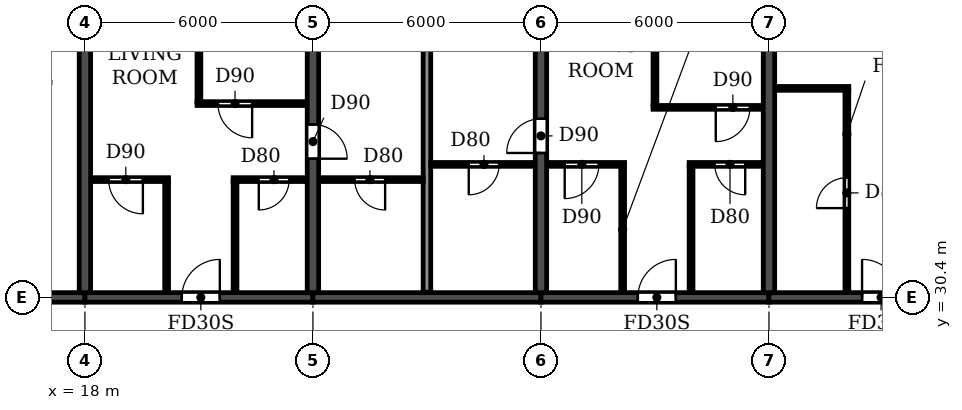
"""IFC4 building model, lengths in metres.
Left out: names, types, materials, properties, quantities, classifications, styles, units other than length and angle.
Written with IfcOpenShell. Run it as: python <this file> out.ifc"""

import sys

from ifc_helpers import new_model, si_unit, direction, frame, frame_2d, origin, place, context, subcontext, project, spatial, rectangle, extrude, element, fill, save


model = new_model("IFC4")
c1 = context("Model", 3, precision=1e-05, world=origin(), true_north=direction((0.0, 1.0)))
c2 = subcontext(c1, "Body", "Model", "MODEL_VIEW")
j1 = project(units=[si_unit("LENGTHUNIT", "METRE"), si_unit("PLANEANGLEUNIT", "RADIAN")], contexts=[c1])
p1 = place(None, origin())
s1 = spatial("IfcSite", under=j1, at=p1, CompositionType="ELEMENT")
p2 = place(p1, origin())
s2 = spatial("IfcBuilding", under=s1, at=p2, CompositionType="ELEMENT")
p3 = place(p2, frame((0.0, 0.0, 132.3)))
s3 = spatial("IfcBuildingStorey", under=s2, at=p3, CompositionType="ELEMENT", Elevation=132.3)
p4 = place(p3, frame((18.0, 30.525, 0.0), z_axis=(0.0, 0.0, 1.0), x_axis=(0.0, 1.0, 0.0)))
e1 = element("IfcWall", 1, at=p4, inside=s3, PredefinedType="SHEAR", context=c2, shape_type="SweptSolid", body=[
    extrude(rectangle(XDim=11.675, YDim=0.3, at=frame_2d((5.837, 0.0))), origin(), (0.0, 0.0, 1.0), 3.07),
])
p5 = place(p3, frame((24.0, 30.525, 0.0), z_axis=(0.0, 0.0, 1.0), x_axis=(0.0, 1.0, 0.0)))
e2 = element("IfcWall", 2, at=p5, inside=s3, PredefinedType="SHEAR", context=c2, shape_type="SweptSolid", body=[
    extrude(rectangle(XDim=11.675, YDim=0.3, at=frame_2d((5.837, 0.0))), origin(), (0.0, 0.0, 1.0), 3.07),
])
p6 = place(p5, frame((3.525, 0.0, 0.0)))
e3 = element("IfcOpeningElement", 3, at=p6, cuts=e2, PredefinedType="OPENING", context=c2, shape_type="SweptSolid", body=[
    extrude(rectangle(XDim=0.9, YDim=2.1, at=frame_2d((0.45, 1.05))), frame((0.0, 0.16, 0.0), z_axis=(0.0, -1.0, 0.0), x_axis=(1.0, 0.0, 0.0)), (0.0, 0.0, 1.0), 0.32),
])
p7 = place(p3, frame((30.0, 30.525, 0.0), z_axis=(0.0, 0.0, 1.0), x_axis=(0.0, 1.0, 0.0)))
e4 = element("IfcWall", 4, at=p7, inside=s3, PredefinedType="SHEAR", context=c2, shape_type="SweptSolid", body=[
    extrude(rectangle(XDim=11.675, YDim=0.3, at=frame_2d((5.837, 0.0))), origin(), (0.0, 0.0, 1.0), 3.07),
])
p8 = place(p7, frame((3.675, 0.0, 0.0)))
e5 = element("IfcOpeningElement", 5, at=p8, cuts=e4, PredefinedType="OPENING", context=c2, shape_type="SweptSolid", body=[
    extrude(rectangle(XDim=0.9, YDim=2.1, at=frame_2d((0.45, 1.05))), frame((0.0, 0.16, 0.0), z_axis=(0.0, -1.0, 0.0), x_axis=(1.0, 0.0, 0.0)), (0.0, 0.0, 1.0), 0.32),
])
p9 = place(p3, frame((36.0, 30.525, 0.0), z_axis=(0.0, 0.0, 1.0), x_axis=(0.0, 1.0, 0.0)))
e6 = element("IfcWall", 6, at=p9, inside=s3, PredefinedType="SHEAR", context=c2, shape_type="SweptSolid", body=[
    extrude(rectangle(XDim=11.675, YDim=0.3, at=frame_2d((5.837, 0.0))), origin(), (0.0, 0.0, 1.0), 3.07),
])
p10 = place(p3, frame((12.2, 30.4, 0.0), z_axis=(0.0, 0.0, 1.0), x_axis=(1.0, 0.0, 0.0)))
e7 = element("IfcWall", 7, at=p10, inside=s3, PredefinedType="SHEAR", context=c2, shape_type="SweptSolid", body=[
    extrude(rectangle(XDim=5.8, YDim=0.25, at=frame_2d((2.9, 0.0))), origin(), (0.0, 0.0, 1.0), 2.47),
])
p11 = place(p10, frame((2.3, 0.0, 0.0)))
e8 = element("IfcOpeningElement", 8, at=p11, cuts=e7, PredefinedType="OPENING", context=c2, shape_type="SweptSolid", body=[
    extrude(rectangle(XDim=1.0, YDim=2.1, at=frame_2d((0.5, 1.05))), frame((0.0, 0.135, 0.0), z_axis=(0.0, -1.0, 0.0), x_axis=(1.0, 0.0, 0.0)), (0.0, 0.0, 1.0), 0.27),
])
p12 = place(p3, frame((18.0, 30.4, 0.0), z_axis=(0.0, 0.0, 1.0), x_axis=(1.0, 0.0, 0.0)))
e9 = element("IfcWall", 9, at=p12, inside=s3, PredefinedType="SHEAR", context=c2, shape_type="SweptSolid", body=[
    extrude(rectangle(XDim=6.0, YDim=0.25, at=frame_2d((3.0, 0.0))), origin(), (0.0, 0.0, 1.0), 2.47),
])
p13 = place(p12, frame((2.55, 0.0, 0.0)))
e10 = element("IfcOpeningElement", 10, at=p13, cuts=e9, PredefinedType="OPENING", context=c2, shape_type="SweptSolid", body=[
    extrude(rectangle(XDim=1.0, YDim=2.1, at=frame_2d((0.5, 1.05))), frame((0.0, 0.135, 0.0), z_axis=(0.0, -1.0, 0.0), x_axis=(1.0, 0.0, 0.0)), (0.0, 0.0, 1.0), 0.27),
])
p14 = place(p3, frame((24.0, 30.4, 0.0), z_axis=(0.0, 0.0, 1.0), x_axis=(1.0, 0.0, 0.0)))
e11 = element("IfcWall", 11, at=p14, inside=s3, PredefinedType="SHEAR", context=c2, shape_type="SweptSolid", body=[
    extrude(rectangle(XDim=6.0, YDim=0.25, at=frame_2d((3.0, 0.0))), origin(), (0.0, 0.0, 1.0), 2.47),
])
p15 = place(p3, frame((30.0, 30.4, 0.0), z_axis=(0.0, 0.0, 1.0), x_axis=(1.0, 0.0, 0.0)))
e12 = element("IfcWall", 12, at=p15, inside=s3, PredefinedType="SHEAR", context=c2, shape_type="SweptSolid", body=[
    extrude(rectangle(XDim=6.0, YDim=0.25, at=frame_2d((3.0, 0.0))), origin(), (0.0, 0.0, 1.0), 2.47),
])
p16 = place(p15, frame((2.55, 0.0, 0.0)))
e13 = element("IfcOpeningElement", 13, at=p16, cuts=e12, PredefinedType="OPENING", context=c2, shape_type="SweptSolid", body=[
    extrude(rectangle(XDim=1.0, YDim=2.1, at=frame_2d((0.5, 1.05))), frame((0.0, 0.135, 0.0), z_axis=(0.0, -1.0, 0.0), x_axis=(1.0, 0.0, 0.0)), (0.0, 0.0, 1.0), 0.27),
])
p17 = place(p3, frame((36.0, 30.4, 0.0), z_axis=(0.0, 0.0, 1.0), x_axis=(1.0, 0.0, 0.0)))
e14 = element("IfcWall", 14, at=p17, inside=s3, PredefinedType="SHEAR", context=c2, shape_type="SweptSolid", body=[
    extrude(rectangle(XDim=6.0, YDim=0.25, at=frame_2d((3.0, 0.0))), origin(), (0.0, 0.0, 1.0), 2.47),
])
p18 = place(p17, frame((2.45, 0.0, 0.0)))
e15 = element("IfcOpeningElement", 15, at=p18, cuts=e14, PredefinedType="OPENING", context=c2, shape_type="SweptSolid", body=[
    extrude(rectangle(XDim=1.0, YDim=2.1, at=frame_2d((0.5, 1.05))), frame((0.0, 0.135, 0.0), z_axis=(0.0, -1.0, 0.0), x_axis=(1.0, 0.0, 0.0)), (0.0, 0.0, 1.0), 0.27),
])
p19 = place(p3, frame((27.0, 30.535, 0.0), z_axis=(0.0, 0.0, 1.0), x_axis=(0.0, 1.0, 0.0)))
e16 = element("IfcWall", 16, at=p19, inside=s3, PredefinedType="PARTITIONING", context=c2, shape_type="SweptSolid", body=[
    extrude(rectangle(XDim=11.805, YDim=0.2, at=frame_2d((5.903, 0.0))), origin(), (0.0, 0.0, 1.0), 3.07),
])
p20 = place(p3, frame((18.16, 33.5, 0.0), z_axis=(0.0, 0.0, 1.0), x_axis=(1.0, 0.0, 0.0)))
e17 = element("IfcWall", 17, at=p20, inside=s3, PredefinedType="PARTITIONING", context=c2, shape_type="SweptSolid", body=[
    extrude(rectangle(XDim=2.04, YDim=0.1, at=frame_2d((1.02, 0.0))), origin(), (0.0, 0.0, 1.0), 3.07),
])
p21 = place(p20, frame((0.465, 0.0, 0.0)))
e18 = element("IfcOpeningElement", 18, at=p21, cuts=e17, PredefinedType="OPENING", context=c2, shape_type="SweptSolid", body=[
    extrude(rectangle(XDim=0.9, YDim=2.1, at=frame_2d((0.45, 1.05))), frame((0.0, 0.06, 0.0), z_axis=(0.0, -1.0, 0.0), x_axis=(1.0, 0.0, 0.0)), (0.0, 0.0, 1.0), 0.12),
])
p22 = place(p3, frame((21.9, 33.5, 0.0), z_axis=(0.0, 0.0, 1.0), x_axis=(1.0, 0.0, 0.0)))
e19 = element("IfcWall", 19, at=p22, inside=s3, PredefinedType="PARTITIONING", context=c2, shape_type="SweptSolid", body=[
    extrude(rectangle(XDim=1.94, YDim=0.1, at=frame_2d((0.97, 0.0))), origin(), (0.0, 0.0, 1.0), 3.07),
])
p23 = place(p22, frame((0.675, 0.0, 0.0)))
e20 = element("IfcOpeningElement", 20, at=p23, cuts=e19, PredefinedType="OPENING", context=c2, shape_type="SweptSolid", body=[
    extrude(rectangle(XDim=0.8, YDim=2.1, at=frame_2d((0.4, 1.05))), frame((0.0, 0.06, 0.0), z_axis=(0.0, -1.0, 0.0), x_axis=(1.0, 0.0, 0.0)), (0.0, 0.0, 1.0), 0.12),
])
p24 = place(p3, frame((24.16, 33.5, 0.0), z_axis=(0.0, 0.0, 1.0), x_axis=(1.0, 0.0, 0.0)))
e21 = element("IfcWall", 21, at=p24, inside=s3, PredefinedType="PARTITIONING", context=c2, shape_type="SweptSolid", body=[
    extrude(rectangle(XDim=2.74, YDim=0.1, at=frame_2d((1.37, 0.0))), origin(), (0.0, 0.0, 1.0), 3.07),
])
p25 = place(p24, frame((0.94, 0.0, 0.0)))
e22 = element("IfcOpeningElement", 22, at=p25, cuts=e21, PredefinedType="OPENING", context=c2, shape_type="SweptSolid", body=[
    extrude(rectangle(XDim=0.8, YDim=2.1, at=frame_2d((0.4, 1.05))), frame((0.0, 0.06, 0.0), z_axis=(0.0, -1.0, 0.0), x_axis=(1.0, 0.0, 0.0)), (0.0, 0.0, 1.0), 0.12),
])
p26 = place(p3, frame((27.1, 33.9, 0.0), z_axis=(0.0, 0.0, 1.0), x_axis=(1.0, 0.0, 0.0)))
e23 = element("IfcWall", 23, at=p26, inside=s3, PredefinedType="PARTITIONING", context=c2, shape_type="SweptSolid", body=[
    extrude(rectangle(XDim=2.74, YDim=0.1, at=frame_2d((1.37, 0.0))), origin(), (0.0, 0.0, 1.0), 3.07),
])
p27 = place(p26, frame((1.0, 0.0, 0.0)))
e24 = element("IfcOpeningElement", 24, at=p27, cuts=e23, PredefinedType="OPENING", context=c2, shape_type="SweptSolid", body=[
    extrude(rectangle(XDim=0.8, YDim=2.1, at=frame_2d((0.4, 1.05))), frame((0.0, 0.06, 0.0), z_axis=(0.0, -1.0, 0.0), x_axis=(1.0, 0.0, 0.0)), (0.0, 0.0, 1.0), 0.12),
])
p28 = place(p3, frame((30.16, 33.9, 0.0), z_axis=(0.0, 0.0, 1.0), x_axis=(1.0, 0.0, 0.0)))
e25 = element("IfcWall", 25, at=p28, inside=s3, PredefinedType="PARTITIONING", context=c2, shape_type="SweptSolid", body=[
    extrude(rectangle(XDim=2.04, YDim=0.1, at=frame_2d((1.02, 0.0))), origin(), (0.0, 0.0, 1.0), 3.07),
])
p29 = place(p28, frame((0.465, 0.0, 0.0)))
e26 = element("IfcOpeningElement", 26, at=p29, cuts=e25, PredefinedType="OPENING", context=c2, shape_type="SweptSolid", body=[
    extrude(rectangle(XDim=0.9, YDim=2.1, at=frame_2d((0.45, 1.05))), frame((0.0, 0.06, 0.0), z_axis=(0.0, -1.0, 0.0), x_axis=(1.0, 0.0, 0.0)), (0.0, 0.0, 1.0), 0.12),
])
p30 = place(p3, frame((33.9, 33.9, 0.0), z_axis=(0.0, 0.0, 1.0), x_axis=(1.0, 0.0, 0.0)))
e27 = element("IfcWall", 27, at=p30, inside=s3, PredefinedType="PARTITIONING", context=c2, shape_type="SweptSolid", body=[
    extrude(rectangle(XDim=1.94, YDim=0.1, at=frame_2d((0.97, 0.0))), origin(), (0.0, 0.0, 1.0), 3.07),
])
p31 = place(p30, frame((0.675, 0.0, 0.0)))
e28 = element("IfcOpeningElement", 28, at=p31, cuts=e27, PredefinedType="OPENING", context=c2, shape_type="SweptSolid", body=[
    extrude(rectangle(XDim=0.8, YDim=2.1, at=frame_2d((0.4, 1.05))), frame((0.0, 0.06, 0.0), z_axis=(0.0, -1.0, 0.0), x_axis=(1.0, 0.0, 0.0)), (0.0, 0.0, 1.0), 0.12),
])
p32 = place(p3, frame((32.95, 35.4, 0.0), z_axis=(0.0, 0.0, 1.0), x_axis=(1.0, 0.0, 0.0)))
e29 = element("IfcWall", 29, at=p32, inside=s3, PredefinedType="PARTITIONING", context=c2, shape_type="SweptSolid", body=[
    extrude(rectangle(XDim=2.89, YDim=0.1, at=frame_2d((1.445, 0.0))), origin(), (0.0, 0.0, 1.0), 3.07),
])
p33 = place(p32, frame((1.65, 0.0, 0.0)))
e30 = element("IfcOpeningElement", 30, at=p33, cuts=e29, PredefinedType="OPENING", context=c2, shape_type="SweptSolid", body=[
    extrude(rectangle(XDim=0.9, YDim=2.1, at=frame_2d((0.45, 1.05))), frame((0.0, 0.06, 0.0), z_axis=(0.0, -1.0, 0.0), x_axis=(1.0, 0.0, 0.0)), (0.0, 0.0, 1.0), 0.12),
])
p34 = place(p3, frame((20.95, 35.5, 0.0), z_axis=(0.0, 0.0, 1.0), x_axis=(1.0, 0.0, 0.0)))
e31 = element("IfcWall", 31, at=p34, inside=s3, PredefinedType="PARTITIONING", context=c2, shape_type="SweptSolid", body=[
    extrude(rectangle(XDim=2.89, YDim=0.1, at=frame_2d((1.445, 0.0))), origin(), (0.0, 0.0, 1.0), 3.07),
])
p35 = place(p34, frame((0.55, 0.0, 0.0)))
e32 = element("IfcOpeningElement", 32, at=p35, cuts=e31, PredefinedType="OPENING", context=c2, shape_type="SweptSolid", body=[
    extrude(rectangle(XDim=0.9, YDim=2.1, at=frame_2d((0.45, 1.05))), frame((0.0, 0.06, 0.0), z_axis=(0.0, -1.0, 0.0), x_axis=(1.0, 0.0, 0.0)), (0.0, 0.0, 1.0), 0.12),
])
p36 = place(p3, frame((36.16, 35.9, 0.0), z_axis=(0.0, 0.0, 1.0), x_axis=(1.0, 0.0, 0.0)))
e33 = element("IfcWall", 33, at=p36, inside=s3, PredefinedType="PARTITIONING", context=c2, shape_type="SweptSolid", body=[
    extrude(rectangle(XDim=1.94, YDim=0.1, at=frame_2d((0.97, 0.0))), origin(), (0.0, 0.0, 1.0), 3.07),
])
p37 = place(p3, frame((20.15, 30.535, 0.0), z_axis=(0.0, 0.0, 1.0), x_axis=(0.0, 1.0, 0.0)))
e34 = element("IfcWall", 34, at=p37, inside=s3, PredefinedType="PARTITIONING", context=c2, shape_type="SweptSolid", body=[
    extrude(rectangle(XDim=2.915, YDim=0.1, at=frame_2d((1.458, 0.0))), origin(), (0.0, 0.0, 1.0), 3.07),
])
p38 = place(p3, frame((21.0, 35.55, 0.0), z_axis=(0.0, 0.0, 1.0), x_axis=(0.0, 1.0, 0.0)))
e35 = element("IfcWall", 35, at=p38, inside=s3, PredefinedType="PARTITIONING", context=c2, shape_type="SweptSolid", body=[
    extrude(rectangle(XDim=6.79, YDim=0.1, at=frame_2d((3.395, 0.0))), origin(), (0.0, 0.0, 1.0), 3.07),
])
p39 = place(p3, frame((21.95, 30.535, 0.0), z_axis=(0.0, 0.0, 1.0), x_axis=(0.0, 1.0, 0.0)))
e36 = element("IfcWall", 36, at=p39, inside=s3, PredefinedType="PARTITIONING", context=c2, shape_type="SweptSolid", body=[
    extrude(rectangle(XDim=2.915, YDim=0.1, at=frame_2d((1.458, 0.0))), origin(), (0.0, 0.0, 1.0), 3.07),
])
p40 = place(p3, frame((32.15, 30.535, 0.0), z_axis=(0.0, 0.0, 1.0), x_axis=(0.0, 1.0, 0.0)))
e37 = element("IfcWall", 37, at=p40, inside=s3, PredefinedType="PARTITIONING", context=c2, shape_type="SweptSolid", body=[
    extrude(rectangle(XDim=3.315, YDim=0.1, at=frame_2d((1.658, 0.0))), origin(), (0.0, 0.0, 1.0), 3.07),
])
p41 = place(p3, frame((33.0, 35.45, 0.0), z_axis=(0.0, 0.0, 1.0), x_axis=(0.0, 1.0, 0.0)))
e38 = element("IfcWall", 38, at=p41, inside=s3, PredefinedType="PARTITIONING", context=c2, shape_type="SweptSolid", body=[
    extrude(rectangle(XDim=6.89, YDim=0.1, at=frame_2d((3.445, 0.0))), origin(), (0.0, 0.0, 1.0), 3.07),
])
p42 = place(p3, frame((33.95, 30.535, 0.0), z_axis=(0.0, 0.0, 1.0), x_axis=(0.0, 1.0, 0.0)))
e39 = element("IfcWall", 39, at=p42, inside=s3, PredefinedType="PARTITIONING", context=c2, shape_type="SweptSolid", body=[
    extrude(rectangle(XDim=3.315, YDim=0.1, at=frame_2d((1.658, 0.0))), origin(), (0.0, 0.0, 1.0), 3.07),
])
p43 = place(p3, frame((38.05, 30.535, 0.0), z_axis=(0.0, 0.0, 1.0), x_axis=(0.0, 1.0, 0.0)))
e40 = element("IfcWall", 40, at=p43, inside=s3, PredefinedType="PARTITIONING", context=c2, shape_type="SweptSolid", body=[
    extrude(rectangle(XDim=5.315, YDim=0.1, at=frame_2d((2.658, 0.0))), origin(), (0.0, 0.0, 1.0), 3.07),
])
p44 = place(p43, frame((2.215, 0.0, 0.0)))
e41 = element("IfcOpeningElement", 41, at=p44, cuts=e40, PredefinedType="OPENING", context=c2, shape_type="SweptSolid", body=[
    extrude(rectangle(XDim=0.8, YDim=2.1, at=frame_2d((0.4, 1.05))), frame((0.0, 0.06, 0.0), z_axis=(0.0, -1.0, 0.0), x_axis=(1.0, 0.0, 0.0)), (0.0, 0.0, 1.0), 0.12),
])
p45 = place(p25, frame((0.8, 0.0, 0.0), z_axis=(0.0, 0.0, 1.0), x_axis=(-1.0, 0.0, 0.0)))
e42 = element("IfcDoor", 42, at=p45, inside=s3, OperationType="SINGLE_SWING_LEFT", PredefinedType="DOOR", context=c2, shape_type="SweptSolid", body=[
    extrude(rectangle(XDim=0.8, YDim=2.1, at=frame_2d((0.4, 1.05))), frame((0.0, 0.025, 0.0), z_axis=(0.0, -1.0, 0.0), x_axis=(1.0, 0.0, 0.0)), (0.0, 0.0, 1.0), 0.05),
])
fill(e22, e42)
p46 = place(p21, frame((0.9, 0.0, 0.0), z_axis=(0.0, 0.0, 1.0), x_axis=(-1.0, 0.0, 0.0)))
e43 = element("IfcDoor", 43, at=p46, inside=s3, OperationType="SINGLE_SWING_LEFT", PredefinedType="DOOR", context=c2, shape_type="SweptSolid", body=[
    extrude(rectangle(XDim=0.9, YDim=2.1, at=frame_2d((0.45, 1.05))), frame((0.0, 0.025, 0.0), z_axis=(0.0, -1.0, 0.0), x_axis=(1.0, 0.0, 0.0)), (0.0, 0.0, 1.0), 0.05),
])
fill(e18, e43)
p47 = place(p13, origin())
e44 = element("IfcDoor", 44, at=p47, inside=s3, OperationType="SINGLE_SWING_RIGHT", PredefinedType="DOOR", context=c2, shape_type="SweptSolid", body=[
    extrude(rectangle(XDim=1.0, YDim=2.1, at=frame_2d((0.5, 1.05))), frame((0.0, 0.025, 0.0), z_axis=(0.0, -1.0, 0.0), x_axis=(1.0, 0.0, 0.0)), (0.0, 0.0, 1.0), 0.05),
])
fill(e10, e44)
p48 = place(p35, frame((0.9, 0.0, 0.0), z_axis=(0.0, 0.0, 1.0), x_axis=(-1.0, 0.0, 0.0)))
e45 = element("IfcDoor", 45, at=p48, inside=s3, OperationType="SINGLE_SWING_LEFT", PredefinedType="DOOR", context=c2, shape_type="SweptSolid", body=[
    extrude(rectangle(XDim=0.9, YDim=2.1, at=frame_2d((0.45, 1.05))), frame((0.0, 0.025, 0.0), z_axis=(0.0, -1.0, 0.0), x_axis=(1.0, 0.0, 0.0)), (0.0, 0.0, 1.0), 0.05),
])
fill(e32, e45)
p49 = place(p23, frame((0.8, 0.0, 0.0), z_axis=(0.0, 0.0, 1.0), x_axis=(-1.0, 0.0, 0.0)))
e46 = element("IfcDoor", 46, at=p49, inside=s3, OperationType="SINGLE_SWING_RIGHT", PredefinedType="DOOR", context=c2, shape_type="SweptSolid", body=[
    extrude(rectangle(XDim=0.8, YDim=2.1, at=frame_2d((0.4, 1.05))), frame((0.0, 0.025, 0.0), z_axis=(0.0, -1.0, 0.0), x_axis=(1.0, 0.0, 0.0)), (0.0, 0.0, 1.0), 0.05),
])
fill(e20, e46)
p50 = place(p6, frame((0.9, 0.0, 0.0), z_axis=(0.0, 0.0, 1.0), x_axis=(-1.0, 0.0, 0.0)))
e47 = element("IfcDoor", 47, at=p50, inside=s3, OperationType="SINGLE_SWING_RIGHT", PredefinedType="DOOR", context=c2, shape_type="SweptSolid", body=[
    extrude(rectangle(XDim=0.9, YDim=2.1, at=frame_2d((0.45, 1.05))), frame((0.0, 0.025, 0.0), z_axis=(0.0, -1.0, 0.0), x_axis=(1.0, 0.0, 0.0)), (0.0, 0.0, 1.0), 0.05),
])
fill(e3, e47)
p51 = place(p27, frame((0.8, 0.0, 0.0), z_axis=(0.0, 0.0, 1.0), x_axis=(-1.0, 0.0, 0.0)))
e48 = element("IfcDoor", 48, at=p51, inside=s3, OperationType="SINGLE_SWING_RIGHT", PredefinedType="DOOR", context=c2, shape_type="SweptSolid", body=[
    extrude(rectangle(XDim=0.8, YDim=2.1, at=frame_2d((0.4, 1.05))), frame((0.0, 0.025, 0.0), z_axis=(0.0, -1.0, 0.0), x_axis=(1.0, 0.0, 0.0)), (0.0, 0.0, 1.0), 0.05),
])
fill(e24, e48)
p52 = place(p8, origin())
e49 = element("IfcDoor", 49, at=p52, inside=s3, OperationType="SINGLE_SWING_LEFT", PredefinedType="DOOR", context=c2, shape_type="SweptSolid", body=[
    extrude(rectangle(XDim=0.9, YDim=2.1, at=frame_2d((0.45, 1.05))), frame((0.0, 0.025, 0.0), z_axis=(0.0, -1.0, 0.0), x_axis=(1.0, 0.0, 0.0)), (0.0, 0.0, 1.0), 0.05),
])
fill(e5, e49)
p53 = place(p29, frame((0.9, 0.0, 0.0), z_axis=(0.0, 0.0, 1.0), x_axis=(-1.0, 0.0, 0.0)))
e50 = element("IfcDoor", 50, at=p53, inside=s3, OperationType="SINGLE_SWING_RIGHT", PredefinedType="DOOR", context=c2, shape_type="SweptSolid", body=[
    extrude(rectangle(XDim=0.9, YDim=2.1, at=frame_2d((0.45, 1.05))), frame((0.0, 0.025, 0.0), z_axis=(0.0, -1.0, 0.0), x_axis=(1.0, 0.0, 0.0)), (0.0, 0.0, 1.0), 0.05),
])
fill(e26, e50)
p54 = place(p16, origin())
e51 = element("IfcDoor", 51, at=p54, inside=s3, OperationType="SINGLE_SWING_RIGHT", PredefinedType="DOOR", context=c2, shape_type="SweptSolid", body=[
    extrude(rectangle(XDim=1.0, YDim=2.1, at=frame_2d((0.5, 1.05))), frame((0.0, 0.025, 0.0), z_axis=(0.0, -1.0, 0.0), x_axis=(1.0, 0.0, 0.0)), (0.0, 0.0, 1.0), 0.05),
])
fill(e13, e51)
p55 = place(p31, frame((0.8, 0.0, 0.0), z_axis=(0.0, 0.0, 1.0), x_axis=(-1.0, 0.0, 0.0)))
e52 = element("IfcDoor", 52, at=p55, inside=s3, OperationType="SINGLE_SWING_LEFT", PredefinedType="DOOR", context=c2, shape_type="SweptSolid", body=[
    extrude(rectangle(XDim=0.8, YDim=2.1, at=frame_2d((0.4, 1.05))), frame((0.0, 0.025, 0.0), z_axis=(0.0, -1.0, 0.0), x_axis=(1.0, 0.0, 0.0)), (0.0, 0.0, 1.0), 0.05),
])
fill(e28, e52)
p56 = place(p33, frame((0.9, 0.0, 0.0), z_axis=(0.0, 0.0, 1.0), x_axis=(-1.0, 0.0, 0.0)))
e53 = element("IfcDoor", 53, at=p56, inside=s3, OperationType="SINGLE_SWING_RIGHT", PredefinedType="DOOR", context=c2, shape_type="SweptSolid", body=[
    extrude(rectangle(XDim=0.9, YDim=2.1, at=frame_2d((0.45, 1.05))), frame((0.0, 0.025, 0.0), z_axis=(0.0, -1.0, 0.0), x_axis=(1.0, 0.0, 0.0)), (0.0, 0.0, 1.0), 0.05),
])
fill(e30, e53)
p57 = place(p44, origin())
e54 = element("IfcDoor", 54, at=p57, inside=s3, OperationType="SINGLE_SWING_LEFT", PredefinedType="DOOR", context=c2, shape_type="SweptSolid", body=[
    extrude(rectangle(XDim=0.8, YDim=2.1, at=frame_2d((0.4, 1.05))), frame((0.0, 0.025, 0.0), z_axis=(0.0, -1.0, 0.0), x_axis=(1.0, 0.0, 0.0)), (0.0, 0.0, 1.0), 0.05),
])
fill(e41, e54)
p58 = place(p18, origin())
e55 = element("IfcDoor", 55, at=p58, inside=s3, OperationType="SINGLE_SWING_LEFT", PredefinedType="DOOR", context=c2, shape_type="SweptSolid", body=[
    extrude(rectangle(XDim=1.0, YDim=2.1, at=frame_2d((0.5, 1.05))), frame((0.0, 0.025, 0.0), z_axis=(0.0, -1.0, 0.0), x_axis=(1.0, 0.0, 0.0)), (0.0, 0.0, 1.0), 0.05),
])
fill(e15, e55)
save(model, sys.argv[1])
